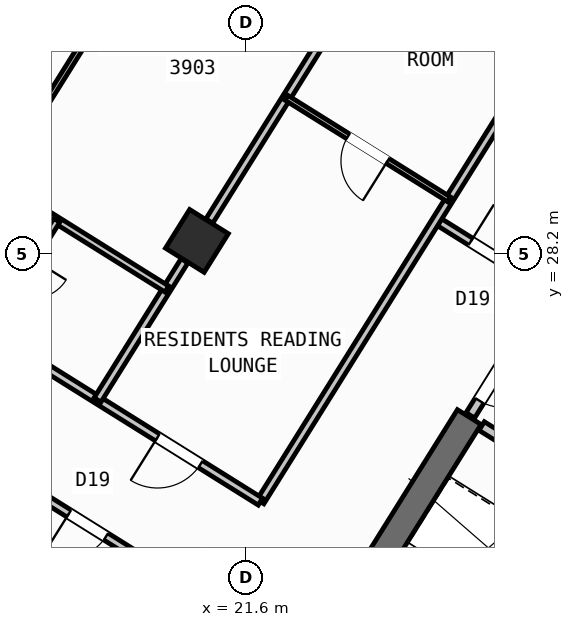
"""IFC4 building model, lengths in metres.
Left out: names, types, materials, properties, quantities, classifications, styles, units other than length and angle.
Written with IfcOpenShell. Run it as: python <this file> out.ifc"""

import sys

from ifc_helpers import new_model, si_unit, direction, frame, frame_2d, origin, origin_2d, place, context, subcontext, project, spatial, rectangle, hollow_rectangle, extrude, source, transform, mapped, element, fill, save


model = new_model("IFC4")
c1 = context("Model", 3, precision=1e-05, world=origin(), true_north=direction((0.0, 1.0)))
c2 = subcontext(c1, "Body", "Model", "MODEL_VIEW")
j1 = project(units=[si_unit("LENGTHUNIT", "METRE"), si_unit("PLANEANGLEUNIT", "RADIAN")], contexts=[c1])
p1 = place(None, origin())
s1 = spatial("IfcSite", under=j1, at=p1, CompositionType="ELEMENT")
p2 = place(p1, origin())
s2 = spatial("IfcBuilding", under=s1, at=p2, CompositionType="ELEMENT")
p3 = place(p2, frame((0.0, 0.0, 155.1)))
s3 = spatial("IfcBuildingStorey", under=s2, at=p3, CompositionType="ELEMENT", Elevation=155.1)
p4 = place(p3, frame((26.007, 24.976, 0.0), z_axis=(0.0, 0.0, 1.0), x_axis=(-0.529923795287, -0.848045264823, 0.0)))
e1 = element("IfcWall", 1, at=p4, inside=s3, PredefinedType="SHEAR", context=c2, shape_type="SweptSolid", body=[
    extrude(rectangle(XDim=6.425, YDim=0.55, at=frame_2d((3.212, 0.0))), origin(), (0.0, 0.0, 1.0), 3.35),
])
m1 = source(origin(), c2, "Body", "SweptSolid", [
    extrude(hollow_rectangle(XDim=0.9, YDim=0.9, WallThickness=0.036, at=origin_2d()), origin(), (0.0, 0.0, 1.0), 3.6),
])
p5 = place(p3, frame((20.632, 28.452, 0.0), z_axis=(0.0, 0.0, 1.0), x_axis=(-0.848048096156, 0.529919264233, 0.0)))
e2 = element("IfcColumn", 2, at=p5, inside=s3, PredefinedType="COLUMN", context=c2, shape_type="MappedRepresentation", body=[
    mapped(m1, transform((0.0, 0.0, 0.0), scale=1.0)),
])
p6 = place(p3, frame((29.268, 6.429, 0.0), z_axis=(0.0, 0.0, 1.0), x_axis=(-0.848049971435, 0.529916263149, 0.0)))
e3 = element("IfcWall", 3, at=p6, inside=s3, PredefinedType="STANDARD", context=c2, shape_type="SweptSolid", body=[
    extrude(rectangle(XDim=31.588, YDim=0.32, at=frame_2d((15.794, 0.0))), origin(), (0.0, 0.0, 1.0), 3.35),
])
p7 = place(p6, frame((16.362, 0.0, 0.0)))
e4 = element("IfcOpeningElement", 4, at=p7, cuts=e3, PredefinedType="OPENING", context=c2, shape_type="SweptSolid", body=[
    extrude(rectangle(XDim=1.2, YDim=2.15, at=frame_2d((0.6, 1.075))), frame((0.0, 0.17, 0.0), z_axis=(0.0, -1.0, 0.0), x_axis=(1.0, 0.0, 0.0)), (0.0, 0.0, 1.0), 0.34),
])
p8 = place(p6, frame((2.989, 0.0, 0.8)))
e5 = element("IfcOpeningElement", 5, at=p8, cuts=e3, PredefinedType="OPENING", context=c2, shape_type="SweptSolid", body=[
    extrude(rectangle(XDim=2.1, YDim=1.55, at=frame_2d((1.05, 0.775))), frame((0.0, 0.17, 0.0), z_axis=(0.0, -1.0, 0.0), x_axis=(1.0, 0.0, 0.0)), (0.0, 0.0, 1.0), 0.34),
])
p9 = place(p6, frame((8.359, 0.0, 0.8)))
e6 = element("IfcOpeningElement", 6, at=p9, cuts=e3, PredefinedType="OPENING", context=c2, shape_type="SweptSolid", body=[
    extrude(rectangle(XDim=2.1, YDim=1.55, at=frame_2d((1.05, 0.775))), frame((0.0, 0.17, 0.0), z_axis=(0.0, -1.0, 0.0), x_axis=(1.0, 0.0, 0.0)), (0.0, 0.0, 1.0), 0.34),
])
p10 = place(p6, frame((13.284, 0.0, 0.95)))
e7 = element("IfcOpeningElement", 7, at=p10, cuts=e3, PredefinedType="OPENING", context=c2, shape_type="SweptSolid", body=[
    extrude(rectangle(XDim=1.2, YDim=1.4, at=frame_2d((0.6, 0.7))), frame((0.0, 0.17, 0.0), z_axis=(0.0, -1.0, 0.0), x_axis=(1.0, 0.0, 0.0)), (0.0, 0.0, 1.0), 0.34),
])
p11 = place(p6, frame((20.259, 0.0, 0.95)))
e8 = element("IfcOpeningElement", 8, at=p11, cuts=e3, PredefinedType="OPENING", context=c2, shape_type="SweptSolid", body=[
    extrude(rectangle(XDim=1.2, YDim=1.4, at=frame_2d((0.6, 0.7))), frame((0.0, 0.17, 0.0), z_axis=(0.0, -1.0, 0.0), x_axis=(1.0, 0.0, 0.0)), (0.0, 0.0, 1.0), 0.34),
])
p12 = place(p6, frame((22.929, 0.0, 0.95)))
e9 = element("IfcOpeningElement", 9, at=p12, cuts=e3, PredefinedType="OPENING", context=c2, shape_type="SweptSolid", body=[
    extrude(rectangle(XDim=1.2, YDim=1.4, at=frame_2d((0.6, 0.7))), frame((0.0, 0.17, 0.0), z_axis=(0.0, -1.0, 0.0), x_axis=(1.0, 0.0, 0.0)), (0.0, 0.0, 1.0), 0.34),
])
p13 = place(p6, frame((27.481, 0.0, 0.8)))
e10 = element("IfcOpeningElement", 10, at=p13, cuts=e3, PredefinedType="OPENING", context=c2, shape_type="SweptSolid", body=[
    extrude(rectangle(XDim=2.1, YDim=1.55, at=frame_2d((1.05, 0.775))), frame((0.0, 0.17, 0.0), z_axis=(0.0, -1.0, 0.0), x_axis=(1.0, 0.0, 0.0)), (0.0, 0.0, 1.0), 0.34),
])
p14 = place(p3, frame((14.138, 41.825, 0.0), z_axis=(0.0, 0.0, 1.0), x_axis=(0.848046498049, -0.529921821731, 0.0)))
e11 = element("IfcWall", 11, at=p14, inside=s3, PredefinedType="STANDARD", context=c2, shape_type="SweptSolid", body=[
    extrude(rectangle(XDim=31.588, YDim=0.32, at=frame_2d((15.794, 0.0))), origin(), (0.0, 0.0, 1.0), 3.35),
])
p15 = place(p14, frame((9.792, 0.0, 0.0)))
e12 = element("IfcOpeningElement", 12, at=p15, cuts=e11, PredefinedType="OPENING", context=c2, shape_type="SweptSolid", body=[
    extrude(rectangle(XDim=1.05, YDim=2.15, at=frame_2d((0.525, 1.075))), frame((0.0, 0.17, 0.0), z_axis=(0.0, -1.0, 0.0), x_axis=(1.0, 0.0, 0.0)), (0.0, 0.0, 1.0), 0.34),
])
p16 = place(p14, frame((0.791, 0.0, 0.85)))
e13 = element("IfcOpeningElement", 13, at=p16, cuts=e11, PredefinedType="OPENING", context=c2, shape_type="SweptSolid", body=[
    extrude(rectangle(XDim=1.8, YDim=1.5, at=frame_2d((0.9, 0.75))), frame((0.0, 0.17, 0.0), z_axis=(0.0, -1.0, 0.0), x_axis=(1.0, 0.0, 0.0)), (0.0, 0.0, 1.0), 0.34),
])
p17 = place(p14, frame((3.996, 0.0, 0.95)))
e14 = element("IfcOpeningElement", 14, at=p17, cuts=e11, PredefinedType="OPENING", context=c2, shape_type="SweptSolid", body=[
    extrude(rectangle(XDim=1.2, YDim=1.4, at=frame_2d((0.6, 0.7))), frame((0.0, 0.17, 0.0), z_axis=(0.0, -1.0, 0.0), x_axis=(1.0, 0.0, 0.0)), (0.0, 0.0, 1.0), 0.34),
])
p18 = place(p14, frame((13.874, 0.0, 0.85)))
e15 = element("IfcOpeningElement", 15, at=p18, cuts=e11, PredefinedType="OPENING", context=c2, shape_type="SweptSolid", body=[
    extrude(rectangle(XDim=1.5, YDim=1.5, at=frame_2d((0.75, 0.75))), frame((0.0, 0.17, 0.0), z_axis=(0.0, -1.0, 0.0), x_axis=(1.0, 0.0, 0.0)), (0.0, 0.0, 1.0), 0.34),
])
p19 = place(p14, frame((17.104, 0.0, 1.0)))
e16 = element("IfcOpeningElement", 16, at=p19, cuts=e11, PredefinedType="OPENING", context=c2, shape_type="SweptSolid", body=[
    extrude(rectangle(XDim=0.9, YDim=1.25, at=frame_2d((0.45, 0.625))), frame((0.0, 0.17, 0.0), z_axis=(0.0, -1.0, 0.0), x_axis=(1.0, 0.0, 0.0)), (0.0, 0.0, 1.0), 0.34),
])
p20 = place(p14, frame((22.069, 0.0, 1.0)))
e17 = element("IfcOpeningElement", 17, at=p20, cuts=e11, PredefinedType="OPENING", context=c2, shape_type="SweptSolid", body=[
    extrude(rectangle(XDim=0.9, YDim=1.25, at=frame_2d((0.45, 0.625))), frame((0.0, 0.17, 0.0), z_axis=(0.0, -1.0, 0.0), x_axis=(1.0, 0.0, 0.0)), (0.0, 0.0, 1.0), 0.34),
])
p21 = place(p14, frame((27.519, 0.0, 1.0)))
e18 = element("IfcOpeningElement", 18, at=p21, cuts=e11, PredefinedType="OPENING", context=c2, shape_type="SweptSolid", body=[
    extrude(rectangle(XDim=0.9, YDim=1.25, at=frame_2d((0.45, 0.625))), frame((0.0, 0.17, 0.0), z_axis=(0.0, -1.0, 0.0), x_axis=(1.0, 0.0, 0.0)), (0.0, 0.0, 1.0), 0.34),
])
p22 = place(p3, frame((31.525, 21.504, 0.0), z_axis=(0.0, 0.0, 1.0), x_axis=(-0.848040211232, 0.529931882541, 0.0)))
e19 = element("IfcWall", 19, at=p22, inside=s3, PredefinedType="STANDARD", context=c2, shape_type="SweptSolid", body=[
    extrude(rectangle(XDim=6.218, YDim=0.2, at=frame_2d((3.109, 0.0))), origin(), (0.0, 0.0, 1.0), 3.34),
])
p23 = place(p22, frame((4.4, 0.0, 0.0)))
e20 = element("IfcOpeningElement", 20, at=p23, cuts=e19, PredefinedType="OPENING", context=c2, shape_type="SweptSolid", body=[
    extrude(rectangle(XDim=0.86, YDim=2.05, at=frame_2d((0.43, 1.025))), frame((0.0, 0.11, 0.0), z_axis=(0.0, -1.0, 0.0), x_axis=(1.0, 0.0, 0.0)), (0.0, 0.0, 1.0), 0.22),
])
p24 = place(p22, frame((0.35, 0.0, 0.0)))
e21 = element("IfcOpeningElement", 21, at=p24, cuts=e19, PredefinedType="OPENING", context=c2, shape_type="SweptSolid", body=[
    extrude(rectangle(XDim=0.86, YDim=2.05, at=frame_2d((0.43, 1.025))), frame((0.0, 0.11, 0.0), z_axis=(0.0, -1.0, 0.0), x_axis=(1.0, 0.0, 0.0)), (0.0, 0.0, 1.0), 0.22),
])
p25 = place(p3, frame((27.596, 27.52, 0.0), z_axis=(0.0, 0.0, 1.0), x_axis=(-0.529865479138, -0.848081702443, 0.0)))
e22 = element("IfcWall", 22, at=p25, inside=s3, PredefinedType="STANDARD", context=c2, shape_type="SweptSolid", body=[
    extrude(rectangle(XDim=2.96, YDim=0.2, at=frame_2d((1.48, 0.0))), origin(), (0.0, 0.0, 1.0), 3.34),
])
p26 = place(p25, frame((1.76, 0.0, 0.0)))
e23 = element("IfcOpeningElement", 23, at=p26, cuts=e22, PredefinedType="OPENING", context=c2, shape_type="SweptSolid", body=[
    extrude(rectangle(XDim=0.86, YDim=2.05, at=frame_2d((0.43, 1.025))), frame((0.0, 0.11, 0.0), z_axis=(0.0, -1.0, 0.0), x_axis=(1.0, 0.0, 0.0)), (0.0, 0.0, 1.0), 0.22),
])
p27 = place(p3, frame((27.57, 27.478, 0.0), z_axis=(0.0, 0.0, 1.0), x_axis=(-0.848050851465, 0.529914854792, 0.0)))
e24 = element("IfcWall", 24, at=p27, inside=s3, PredefinedType="PARTITIONING", context=c2, shape_type="SweptSolid", body=[
    extrude(rectangle(XDim=2.61, YDim=0.16, at=frame_2d((1.305, 0.0))), origin(), (0.0, 0.0, 1.0), 3.34),
])
p28 = place(p27, frame((0.95, 0.0, 0.0)))
e25 = element("IfcOpeningElement", 25, at=p28, cuts=e24, PredefinedType="OPENING", context=c2, shape_type="SweptSolid", body=[
    extrude(rectangle(XDim=0.86, YDim=2.05, at=frame_2d((0.43, 1.025))), frame((0.0, 0.09, 0.0), z_axis=(0.0, -1.0, 0.0), x_axis=(1.0, 0.0, 0.0)), (0.0, 0.0, 1.0), 0.18),
])
p29 = place(p3, frame((27.953, 33.016, 0.0), z_axis=(0.0, 0.0, 1.0), x_axis=(-0.529905022231, -0.848056995381, 0.0)))
e26 = element("IfcWall", 26, at=p29, inside=s3, PredefinedType="PARTITIONING", context=c2, shape_type="SweptSolid", body=[
    extrude(rectangle(XDim=11.45, YDim=0.16, at=frame_2d((5.725, 0.0))), origin(), (0.0, 0.0, 1.0), 3.34),
])
p30 = place(p3, frame((21.885, 23.306, 0.0), z_axis=(0.0, 0.0, 1.0), x_axis=(-0.848052408131, 0.529912363569, 0.0)))
e27 = element("IfcWall", 27, at=p30, inside=s3, PredefinedType="PARTITIONING", context=c2, shape_type="SweptSolid", body=[
    extrude(rectangle(XDim=16.73, YDim=0.16, at=frame_2d((8.365, 0.0))), origin(), (0.0, 0.0, 1.0), 3.34),
])
p31 = place(p30, frame((1.395, 0.0, 0.0)))
e28 = element("IfcOpeningElement", 28, at=p31, cuts=e27, PredefinedType="OPENING", context=c2, shape_type="SweptSolid", body=[
    extrude(rectangle(XDim=1.0, YDim=2.1, at=frame_2d((0.5, 1.05))), frame((0.0, 0.09, 0.0), z_axis=(0.0, -1.0, 0.0), x_axis=(1.0, 0.0, 0.0)), (0.0, 0.0, 1.0), 0.18),
])
p32 = place(p30, frame((7.82, 0.0, 0.0)))
e29 = element("IfcOpeningElement", 29, at=p32, cuts=e27, PredefinedType="OPENING", context=c2, shape_type="SweptSolid", body=[
    extrude(rectangle(XDim=1.0, YDim=2.1, at=frame_2d((0.5, 1.05))), frame((0.0, 0.09, 0.0), z_axis=(0.0, -1.0, 0.0), x_axis=(1.0, 0.0, 0.0)), (0.0, 0.0, 1.0), 0.18),
])
p33 = place(p30, frame((11.14, 0.0, 0.0)))
e30 = element("IfcOpeningElement", 30, at=p33, cuts=e27, PredefinedType="OPENING", context=c2, shape_type="SweptSolid", body=[
    extrude(rectangle(XDim=1.0, YDim=2.1, at=frame_2d((0.5, 1.05))), frame((0.0, 0.09, 0.0), z_axis=(0.0, -1.0, 0.0), x_axis=(1.0, 0.0, 0.0)), (0.0, 0.0, 1.0), 0.18),
])
p34 = place(p3, frame((20.719, 21.44, 0.0), z_axis=(0.0, 0.0, 1.0), x_axis=(-0.848048310262, 0.529918921593, 0.0)))
e31 = element("IfcWall", 31, at=p34, inside=s3, PredefinedType="PARTITIONING", context=c2, shape_type="SweptSolid", body=[
    extrude(rectangle(XDim=16.73, YDim=0.16, at=frame_2d((8.365, 0.0))), origin(), (0.0, 0.0, 1.0), 3.34),
])
p35 = place(p34, frame((2.22, 0.0, 0.0)))
e32 = element("IfcOpeningElement", 32, at=p35, cuts=e31, PredefinedType="OPENING", context=c2, shape_type="SweptSolid", body=[
    extrude(rectangle(XDim=0.86, YDim=2.05, at=frame_2d((0.43, 1.025))), frame((0.0, 0.09, 0.0), z_axis=(0.0, -1.0, 0.0), x_axis=(1.0, 0.0, 0.0)), (0.0, 0.0, 1.0), 0.18),
])
p36 = place(p34, frame((6.49, 0.0, 0.0)))
e33 = element("IfcOpeningElement", 33, at=p36, cuts=e31, PredefinedType="OPENING", context=c2, shape_type="SweptSolid", body=[
    extrude(rectangle(XDim=1.0, YDim=2.1, at=frame_2d((0.5, 1.05))), frame((0.0, 0.09, 0.0), z_axis=(0.0, -1.0, 0.0), x_axis=(1.0, 0.0, 0.0)), (0.0, 0.0, 1.0), 0.18),
])
p37 = place(p34, frame((14.304, 0.0, 0.0)))
e34 = element("IfcOpeningElement", 34, at=p37, cuts=e31, PredefinedType="OPENING", context=c2, shape_type="SweptSolid", body=[
    extrude(rectangle(XDim=1.0, YDim=2.1, at=frame_2d((0.5, 1.05))), frame((0.0, 0.09, 0.0), z_axis=(0.0, -1.0, 0.0), x_axis=(1.0, 0.0, 0.0)), (0.0, 0.0, 1.0), 0.18),
])
p38 = place(p3, frame((24.256, 34.251, 0.0), z_axis=(0.0, 0.0, 1.0), x_axis=(-0.529919772691, -0.848047778437, 0.0)))
e35 = element("IfcWall", 35, at=p38, inside=s3, PredefinedType="PARTITIONING", context=c2, shape_type="SweptSolid", body=[
    extrude(rectangle(XDim=6.376, YDim=0.16, at=frame_2d((3.188, 0.0))), origin(), (0.0, 0.0, 1.0), 2.775),
])
p39 = place(p3, frame((20.387, 28.06, 0.0), z_axis=(0.0, 0.0, 1.0), x_axis=(-0.529890499457, -0.848066069705, 0.0)))
e36 = element("IfcWall", 36, at=p39, inside=s3, PredefinedType="PARTITIONING", context=c2, shape_type="SweptSolid", body=[
    extrude(rectangle(XDim=3.238, YDim=0.16, at=frame_2d((1.619, 0.0))), origin(), (0.0, 0.0, 1.0), 2.775),
])
p40 = place(p3, frame((25.612, 29.269, 0.0), z_axis=(0.0, 0.0, 1.0), x_axis=(-0.84803087207, 0.529946827537, 0.0)))
e37 = element("IfcWall", 37, at=p40, inside=s3, PredefinedType="PARTITIONING", context=c2, shape_type="SweptSolid", body=[
    extrude(rectangle(XDim=3.79, YDim=0.11, at=frame_2d((1.895, 0.0))), origin(), (0.0, 0.0, 1.0), 3.34),
])
p41 = place(p40, frame((1.435, 0.0, 0.0)))
e38 = element("IfcOpeningElement", 38, at=p41, cuts=e37, PredefinedType="OPENING", context=c2, shape_type="SweptSolid", body=[
    extrude(rectangle(XDim=0.92, YDim=2.08, at=frame_2d((0.46, 1.04))), frame((0.0, 0.065, 0.0), z_axis=(0.0, -1.0, 0.0), x_axis=(1.0, 0.0, 0.0)), (0.0, 0.0, 1.0), 0.13),
])
p42 = place(p3, frame((20.039, 27.502, 0.0), z_axis=(0.0, 0.0, 1.0), x_axis=(-0.848039019877, 0.529933789039, 0.0)))
e39 = element("IfcWall", 39, at=p42, inside=s3, PredefinedType="PLUMBINGWALL", context=c2, shape_type="SweptSolid", body=[
    extrude(rectangle(XDim=6.4, YDim=0.14, at=frame_2d((3.2, 0.0))), origin(), (0.0, 0.0, 1.0), 3.34),
])
p43 = place(p42, frame((2.824, 0.0, 0.0)))
e40 = element("IfcOpeningElement", 40, at=p43, cuts=e39, PredefinedType="OPENING", context=c2, shape_type="SweptSolid", body=[
    extrude(rectangle(XDim=0.78, YDim=2.05, at=frame_2d((0.39, 1.025))), frame((0.0, 0.08, 0.0), z_axis=(0.0, -1.0, 0.0), x_axis=(1.0, 0.0, 0.0)), (0.0, 0.0, 1.0), 0.16),
])
p44 = place(p3, frame((17.867, 28.859, 0.0), z_axis=(0.0, 0.0, 1.0), x_axis=(-0.529913878929, -0.848051461244, 0.0)))
e41 = element("IfcWall", 41, at=p44, inside=s3, PredefinedType="PLUMBINGWALL", context=c2, shape_type="SweptSolid", body=[
    extrude(rectangle(XDim=2.58, YDim=0.14, at=frame_2d((1.29, 0.0))), origin(), (0.0, 0.0, 1.0), 3.34),
])
p45 = place(p44, frame((0.9, 0.0, 0.0)))
e42 = element("IfcOpeningElement", 42, at=p45, cuts=e41, PredefinedType="OPENING", context=c2, shape_type="SweptSolid", body=[
    extrude(rectangle(XDim=0.78, YDim=2.05, at=frame_2d((0.39, 1.025))), frame((0.0, 0.08, 0.0), z_axis=(0.0, -1.0, 0.0), x_axis=(1.0, 0.0, 0.0)), (0.0, 0.0, 1.0), 0.16),
])
p46 = place(p3, frame((21.517, 37.356, 0.0), z_axis=(0.0, 0.0, 1.0), x_axis=(-0.529919705034, -0.848047820713, 0.0)))
e43 = element("IfcWall", 43, at=p46, inside=s3, PredefinedType="PARTITIONING", context=c2, shape_type="SweptSolid", body=[
    extrude(rectangle(XDim=9.14, YDim=0.11, at=frame_2d((4.57, 0.0))), origin(), (0.0, 0.0, 1.0), 3.34),
])
p47 = place(p46, frame((0.47, 0.0, 0.0)))
e44 = element("IfcOpeningElement", 44, at=p47, cuts=e43, PredefinedType="OPENING", context=c2, shape_type="SweptSolid", body=[
    extrude(rectangle(XDim=0.92, YDim=2.08, at=frame_2d((0.46, 1.04))), frame((0.0, 0.065, 0.0), z_axis=(0.0, -1.0, 0.0), x_axis=(1.0, 0.0, 0.0)), (0.0, 0.0, 1.0), 0.13),
])
m2 = source(origin(), c2, "Body", "SweptSolid", [
    extrude(rectangle(XDim=0.86, YDim=2.05, at=frame_2d((0.43, 1.025))), frame((0.0, 0.025, 0.0), z_axis=(0.0, -1.0, 0.0), x_axis=(1.0, 0.0, 0.0)), (0.0, 0.0, 1.0), 0.05),
])
p48 = place(p28, frame((0.86, 0.0, 0.0), z_axis=(0.0, 0.0, 1.0), x_axis=(-1.0, 0.0, 0.0)))
e45 = element("IfcDoor", 45, at=p48, inside=s3, OperationType="SINGLE_SWING_LEFT", PredefinedType="DOOR", context=c2, shape_type="MappedRepresentation", body=[
    mapped(m2, transform((0.0, 0.0, 0.0), scale=1.0)),
])
fill(e25, e45)
p49 = place(p26, origin())
e46 = element("IfcDoor", 46, at=p49, inside=s3, OperationType="SINGLE_SWING_LEFT", PredefinedType="DOOR", context=c2, shape_type="MappedRepresentation", body=[
    mapped(m2, transform((0.0, 0.0, 0.0), scale=1.0)),
])
fill(e23, e46)
p50 = place(p35, origin())
e47 = element("IfcDoor", 47, at=p50, inside=s3, OperationType="SINGLE_SWING_RIGHT", PredefinedType="DOOR", context=c2, shape_type="MappedRepresentation", body=[
    mapped(m2, transform((0.0, 0.0, 0.0), scale=1.0)),
])
fill(e32, e47)
m3 = source(origin(), c2, "Body", "SweptSolid", [
    extrude(rectangle(XDim=1.0, YDim=2.1, at=frame_2d((0.5, 1.05))), frame((0.0, 0.025, 0.0), z_axis=(0.0, -1.0, 0.0), x_axis=(1.0, 0.0, 0.0)), (0.0, 0.0, 1.0), 0.05),
])
p51 = place(p31, origin())
e48 = element("IfcDoor", 48, at=p51, inside=s3, OperationType="SINGLE_SWING_RIGHT", PredefinedType="DOOR", context=c2, shape_type="MappedRepresentation", body=[
    mapped(m3, transform((0.0, 0.0, 0.0), scale=1.0)),
])
fill(e28, e48)
m4 = source(origin(), c2, "Body", "SweptSolid", [
    extrude(rectangle(XDim=0.92, YDim=2.08, at=frame_2d((0.46, 1.04))), frame((0.0, 0.025, 0.0), z_axis=(0.0, -1.0, 0.0), x_axis=(1.0, 0.0, 0.0)), (0.0, 0.0, 1.0), 0.05),
])
p52 = place(p41, origin())
e49 = element("IfcDoor", 49, at=p52, inside=s3, OperationType="SINGLE_SWING_LEFT", PredefinedType="DOOR", context=c2, shape_type="MappedRepresentation", body=[
    mapped(m4, transform((0.0, 0.0, 0.0), scale=1.0)),
])
fill(e38, e49)
save(model, sys.argv[1])
